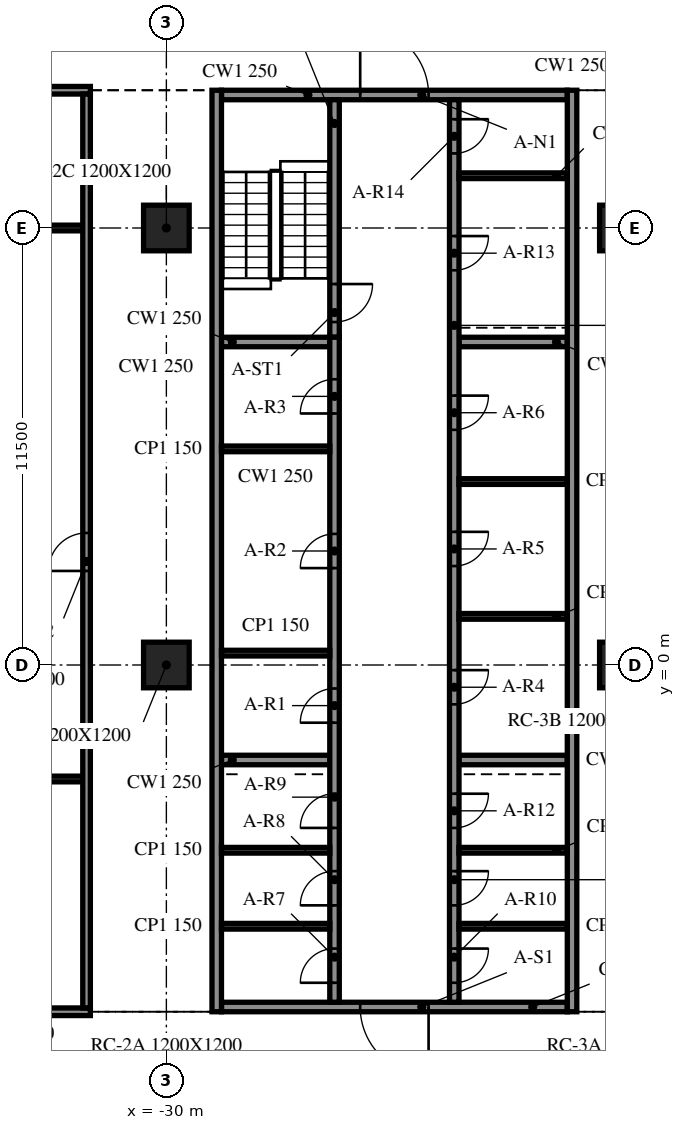
"""IFC4 building model, lengths in metres.
Left out: names, types, materials, properties, quantities, classifications, styles, units other than length and angle.
Written with IfcOpenShell. Run it as: python <this file> out.ifc"""

import sys

from ifc_helpers import new_model, si_unit, direction, frame, frame_2d, origin, origin_2d, place, context, subcontext, project, spatial, rectangle, extrude, element, fill, save


model = new_model("IFC4")
c1 = context("Model", 3, precision=1e-05, world=origin(), true_north=direction((0.0, 1.0)))
c2 = subcontext(c1, "Body", "Model", "MODEL_VIEW")
j1 = project(units=[si_unit("LENGTHUNIT", "METRE"), si_unit("PLANEANGLEUNIT", "RADIAN")], contexts=[c1])
p1 = place(None, origin())
s1 = spatial("IfcSite", under=j1, at=p1, CompositionType="ELEMENT")
p2 = place(p1, origin())
s2 = spatial("IfcBuilding", under=s1, at=p2, CompositionType="ELEMENT")
p3 = place(p2, frame((0.0, 0.0, 185.8)))
s3 = spatial("IfcBuildingStorey", under=s2, at=p3, CompositionType="ELEMENT", Elevation=185.8)
for number, where, z_axis, x_axis in (
    (1, (-30.0, 0.0, -0.34), (0.0, 0.0, 1.0), (1.0, 0.0, 0.0)),
    (2, (-30.0, 11.5, -0.34), (0.0, 0.0, 1.0), (1.0, 0.0, 0.0)),
    (3, (-18.0, 0.0, -0.34), (0.0, 0.0, 1.0), (1.0, 0.0, 0.0)),
    (4, (-18.0, 11.5, -0.34), (0.0, 0.0, 1.0), (1.0, 0.0, 0.0)),
):
    element("IfcColumn", number, at=place(p3, frame(where, z_axis=z_axis, x_axis=x_axis)), inside=s3, PredefinedType="COLUMN", context=c2, shape_type="SweptSolid", body=[
        extrude(rectangle(XDim=1.2, YDim=1.2, at=origin_2d()), origin(), (0.0, 0.0, 1.0), 3.74),
    ])
for number, where, z_axis, x_axis in (
    (5, (-28.675, 15.125, 0.0), (0.0, 0.0, 1.0), (0.0, -1.0, 0.0)),
    (6, (-19.325, -9.125, 0.0), (0.0, 0.0, 1.0), (0.0, 1.0, 0.0)),
):
    element("IfcWall", number, at=place(p3, frame(where, z_axis=z_axis, x_axis=x_axis)), inside=s3, PredefinedType="SOLIDWALL", context=c2, shape_type="SweptSolid", body=[
        extrude(rectangle(XDim=24.25, YDim=0.25, at=frame_2d((12.125, 0.0))), origin(), (0.0, 0.0, 1.0), 3.4),
    ])
p4 = place(p3, frame((-19.45, -9.0, 0.0), z_axis=(0.0, 0.0, 1.0), x_axis=(-1.0, 0.0, 0.0)))
e7 = element("IfcWall", 7, at=p4, inside=s3, PredefinedType="SOLIDWALL", context=c2, shape_type="SweptSolid", body=[
    extrude(rectangle(XDim=9.1, YDim=0.25, at=frame_2d((4.55, 0.0))), origin(), (0.0, 0.0, 1.0), 3.4),
])
p5 = place(p4, frame((3.65, 0.0, 0.0)))
e8 = element("IfcOpeningElement", 8, at=p5, cuts=e7, PredefinedType="OPENING", context=c2, shape_type="SweptSolid", body=[
    extrude(rectangle(XDim=1.8, YDim=2.1, at=frame_2d((0.9, 1.05))), frame((0.0, 0.135, 0.0), z_axis=(0.0, -1.0, 0.0), x_axis=(1.0, 0.0, 0.0)), (0.0, 0.0, 1.0), 0.27),
])
p6 = place(p3, frame((-28.55, 15.0, 0.0), z_axis=(0.0, 0.0, 1.0), x_axis=(1.0, 0.0, 0.0)))
e9 = element("IfcWall", 9, at=p6, inside=s3, PredefinedType="SOLIDWALL", context=c2, shape_type="SweptSolid", body=[
    extrude(rectangle(XDim=9.1, YDim=0.25, at=frame_2d((4.55, 0.0))), origin(), (0.0, 0.0, 1.0), 3.4),
])
p7 = place(p6, frame((3.65, 0.0, 0.0)))
e10 = element("IfcOpeningElement", 10, at=p7, cuts=e9, PredefinedType="OPENING", context=c2, shape_type="SweptSolid", body=[
    extrude(rectangle(XDim=1.8, YDim=2.1, at=frame_2d((0.9, 1.05))), frame((0.0, 0.135, 0.0), z_axis=(0.0, -1.0, 0.0), x_axis=(1.0, 0.0, 0.0)), (0.0, 0.0, 1.0), 0.27),
])
p8 = place(p3, frame((-25.575, -8.875, 0.0), z_axis=(0.0, 0.0, 1.0), x_axis=(0.0, 1.0, 0.0)))
e11 = element("IfcWall", 11, at=p8, inside=s3, PredefinedType="SOLIDWALL", context=c2, shape_type="SweptSolid", body=[
    extrude(rectangle(XDim=17.5, YDim=0.25, at=frame_2d((8.75, 0.0))), origin(), (0.0, 0.0, 1.0), 3.4),
])
p9 = place(p8, frame((7.356, 0.0, 0.0)))
e12 = element("IfcOpeningElement", 12, at=p9, cuts=e11, PredefinedType="OPENING", context=c2, shape_type="SweptSolid", body=[
    extrude(rectangle(XDim=0.9, YDim=2.1, at=frame_2d((0.45, 1.05))), frame((0.0, 0.135, 0.0), z_axis=(0.0, -1.0, 0.0), x_axis=(1.0, 0.0, 0.0)), (0.0, 0.0, 1.0), 0.27),
])
p10 = place(p8, frame((11.425, 0.0, 0.0)))
e13 = element("IfcOpeningElement", 13, at=p10, cuts=e11, PredefinedType="OPENING", context=c2, shape_type="SweptSolid", body=[
    extrude(rectangle(XDim=0.9, YDim=2.1, at=frame_2d((0.45, 1.05))), frame((0.0, 0.135, 0.0), z_axis=(0.0, -1.0, 0.0), x_axis=(1.0, 0.0, 0.0)), (0.0, 0.0, 1.0), 0.27),
])
p11 = place(p8, frame((15.494, 0.0, 0.0)))
e14 = element("IfcOpeningElement", 14, at=p11, cuts=e11, PredefinedType="OPENING", context=c2, shape_type="SweptSolid", body=[
    extrude(rectangle(XDim=0.9, YDim=2.1, at=frame_2d((0.45, 1.05))), frame((0.0, 0.135, 0.0), z_axis=(0.0, -1.0, 0.0), x_axis=(1.0, 0.0, 0.0)), (0.0, 0.0, 1.0), 0.27),
])
p12 = place(p8, frame((0.512, 0.0, 0.0)))
e15 = element("IfcOpeningElement", 15, at=p12, cuts=e11, PredefinedType="OPENING", context=c2, shape_type="SweptSolid", body=[
    extrude(rectangle(XDim=0.9, YDim=2.1, at=frame_2d((0.45, 1.05))), frame((0.0, 0.135, 0.0), z_axis=(0.0, -1.0, 0.0), x_axis=(1.0, 0.0, 0.0)), (0.0, 0.0, 1.0), 0.27),
])
p13 = place(p8, frame((2.55, 0.0, 0.0)))
e16 = element("IfcOpeningElement", 16, at=p13, cuts=e11, PredefinedType="OPENING", context=c2, shape_type="SweptSolid", body=[
    extrude(rectangle(XDim=0.9, YDim=2.1, at=frame_2d((0.45, 1.05))), frame((0.0, 0.135, 0.0), z_axis=(0.0, -1.0, 0.0), x_axis=(1.0, 0.0, 0.0)), (0.0, 0.0, 1.0), 0.27),
])
p14 = place(p8, frame((4.587, 0.0, 0.0)))
e17 = element("IfcOpeningElement", 17, at=p14, cuts=e11, PredefinedType="OPENING", context=c2, shape_type="SweptSolid", body=[
    extrude(rectangle(XDim=0.9, YDim=2.1, at=frame_2d((0.45, 1.05))), frame((0.0, 0.135, 0.0), z_axis=(0.0, -1.0, 0.0), x_axis=(1.0, 0.0, 0.0)), (0.0, 0.0, 1.0), 0.27),
])
p15 = place(p3, frame((-25.575, 14.875, 0.0), z_axis=(0.0, 0.0, 1.0), x_axis=(0.0, -1.0, 0.0)))
e18 = element("IfcWall", 18, at=p15, inside=s3, PredefinedType="SOLIDWALL", context=c2, shape_type="SweptSolid", body=[
    extrude(rectangle(XDim=6.25, YDim=0.25, at=frame_2d((3.125, 0.0))), origin(), (0.0, 0.0, 1.0), 3.4),
])
p16 = place(p15, frame((4.85, 0.0, 0.0)))
e19 = element("IfcOpeningElement", 19, at=p16, cuts=e18, PredefinedType="OPENING", context=c2, shape_type="SweptSolid", body=[
    extrude(rectangle(XDim=1.0, YDim=2.1, at=frame_2d((0.5, 1.05))), frame((0.0, 0.135, 0.0), z_axis=(0.0, -1.0, 0.0), x_axis=(1.0, 0.0, 0.0)), (0.0, 0.0, 1.0), 0.27),
])
p17 = place(p3, frame((-22.425, 14.875, 0.0), z_axis=(0.0, 0.0, 1.0), x_axis=(0.0, -1.0, 0.0)))
e20 = element("IfcWall", 20, at=p17, inside=s3, PredefinedType="SOLIDWALL", context=c2, shape_type="SweptSolid", body=[
    extrude(rectangle(XDim=23.75, YDim=0.25, at=frame_2d((11.875, 0.0))), origin(), (0.0, 0.0, 1.0), 3.4),
])
p18 = place(p17, frame((15.01, 0.0, 0.0)))
e21 = element("IfcOpeningElement", 21, at=p18, cuts=e20, PredefinedType="OPENING", context=c2, shape_type="SweptSolid", body=[
    extrude(rectangle(XDim=0.9, YDim=2.1, at=frame_2d((0.45, 1.05))), frame((0.0, 0.135, 0.0), z_axis=(0.0, -1.0, 0.0), x_axis=(1.0, 0.0, 0.0)), (0.0, 0.0, 1.0), 0.27),
])
p19 = place(p17, frame((11.371, 0.0, 0.0)))
e22 = element("IfcOpeningElement", 22, at=p19, cuts=e20, PredefinedType="OPENING", context=c2, shape_type="SweptSolid", body=[
    extrude(rectangle(XDim=0.9, YDim=2.1, at=frame_2d((0.45, 1.05))), frame((0.0, 0.135, 0.0), z_axis=(0.0, -1.0, 0.0), x_axis=(1.0, 0.0, 0.0)), (0.0, 0.0, 1.0), 0.27),
])
p20 = place(p17, frame((7.786, 0.0, 0.0)))
e23 = element("IfcOpeningElement", 23, at=p20, cuts=e20, PredefinedType="OPENING", context=c2, shape_type="SweptSolid", body=[
    extrude(rectangle(XDim=0.9, YDim=2.1, at=frame_2d((0.45, 1.05))), frame((0.0, 0.135, 0.0), z_axis=(0.0, -1.0, 0.0), x_axis=(1.0, 0.0, 0.0)), (0.0, 0.0, 1.0), 0.27),
])
p21 = place(p17, frame((22.337, 0.0, 0.0)))
e24 = element("IfcOpeningElement", 24, at=p21, cuts=e20, PredefinedType="OPENING", context=c2, shape_type="SweptSolid", body=[
    extrude(rectangle(XDim=0.9, YDim=2.1, at=frame_2d((0.45, 1.05))), frame((0.0, 0.135, 0.0), z_axis=(0.0, -1.0, 0.0), x_axis=(1.0, 0.0, 0.0)), (0.0, 0.0, 1.0), 0.27),
])
p22 = place(p17, frame((20.3, 0.0, 0.0)))
e25 = element("IfcOpeningElement", 25, at=p22, cuts=e20, PredefinedType="OPENING", context=c2, shape_type="SweptSolid", body=[
    extrude(rectangle(XDim=0.9, YDim=2.1, at=frame_2d((0.45, 1.05))), frame((0.0, 0.135, 0.0), z_axis=(0.0, -1.0, 0.0), x_axis=(1.0, 0.0, 0.0)), (0.0, 0.0, 1.0), 0.27),
])
p23 = place(p17, frame((18.262, 0.0, 0.0)))
e26 = element("IfcOpeningElement", 26, at=p23, cuts=e20, PredefinedType="OPENING", context=c2, shape_type="SweptSolid", body=[
    extrude(rectangle(XDim=0.9, YDim=2.1, at=frame_2d((0.45, 1.05))), frame((0.0, 0.135, 0.0), z_axis=(0.0, -1.0, 0.0), x_axis=(1.0, 0.0, 0.0)), (0.0, 0.0, 1.0), 0.27),
])
p24 = place(p17, frame((3.587, 0.0, 0.0)))
e27 = element("IfcOpeningElement", 27, at=p24, cuts=e20, PredefinedType="OPENING", context=c2, shape_type="SweptSolid", body=[
    extrude(rectangle(XDim=0.9, YDim=2.1, at=frame_2d((0.45, 1.05))), frame((0.0, 0.135, 0.0), z_axis=(0.0, -1.0, 0.0), x_axis=(1.0, 0.0, 0.0)), (0.0, 0.0, 1.0), 0.27),
])
p25 = place(p17, frame((0.512, 0.0, 0.0)))
e28 = element("IfcOpeningElement", 28, at=p25, cuts=e20, PredefinedType="OPENING", context=c2, shape_type="SweptSolid", body=[
    extrude(rectangle(XDim=0.9, YDim=2.1, at=frame_2d((0.45, 1.05))), frame((0.0, 0.135, 0.0), z_axis=(0.0, -1.0, 0.0), x_axis=(1.0, 0.0, 0.0)), (0.0, 0.0, 1.0), 0.27),
])
for number, where, z_axis, x_axis in (
    (29, (-28.55, -2.5, 0.0), (0.0, 0.0, 1.0), (1.0, 0.0, 0.0)),
    (30, (-28.55, 8.5, 0.0), (0.0, 0.0, 1.0), (1.0, 0.0, 0.0)),
    (31, (-22.3, -2.5, 0.0), (0.0, 0.0, 1.0), (1.0, 0.0, 0.0)),
    (32, (-22.3, 8.5, 0.0), (0.0, 0.0, 1.0), (1.0, 0.0, 0.0)),
):
    element("IfcWall", number, at=place(p3, frame(where, z_axis=z_axis, x_axis=x_axis)), inside=s3, PredefinedType="SOLIDWALL", context=c2, shape_type="SweptSolid", body=[
        extrude(rectangle(XDim=2.85, YDim=0.25, at=frame_2d((1.425, 0.0))), origin(), (0.0, 0.0, 1.0), 3.4),
    ])
for number, where, z_axis, x_axis in (
    (33, (-28.55, 0.312, 0.0), (0.0, 0.0, 1.0), (1.0, 0.0, 0.0)),
    (34, (-28.55, 5.688, 0.0), (0.0, 0.0, 1.0), (1.0, 0.0, 0.0)),
    (35, (-22.3, 1.28, 0.0), (0.0, 0.0, 1.0), (1.0, 0.0, 0.0)),
    (36, (-22.3, 4.827, 0.0), (0.0, 0.0, 1.0), (1.0, 0.0, 0.0)),
    (37, (-28.55, -6.875, 0.0), (0.0, 0.0, 1.0), (1.0, 0.0, 0.0)),
    (38, (-28.55, -4.875, 0.0), (0.0, 0.0, 1.0), (1.0, 0.0, 0.0)),
    (39, (-22.3, -6.875, 0.0), (0.0, 0.0, 1.0), (1.0, 0.0, 0.0)),
    (40, (-22.3, -4.875, 0.0), (0.0, 0.0, 1.0), (1.0, 0.0, 0.0)),
    (41, (-22.3, 12.875, 0.0), (0.0, 0.0, 1.0), (1.0, 0.0, 0.0)),
):
    element("IfcWall", number, at=place(p3, frame(where, z_axis=z_axis, x_axis=x_axis)), inside=s3, PredefinedType="PARTITIONING", context=c2, shape_type="SweptSolid", body=[
        extrude(rectangle(XDim=2.85, YDim=0.15, at=frame_2d((1.425, 0.0))), origin(), (0.0, 0.0, 1.0), 3.4),
    ])
p26 = place(p3, frame((-47.975, -9.125, 0.0), z_axis=(0.0, 0.0, 1.0), x_axis=(1.0, 0.0, 0.0)))
e42 = element("IfcWall", 42, at=p26, inside=s3, PredefinedType="PARTITIONING", context=c2, shape_type="SweptSolid", body=[
    extrude(rectangle(XDim=15.975, YDim=0.2, at=frame_2d((7.988, 0.0))), origin(), (0.0, 0.0, 1.0), 3.4),
])
p27 = place(p26, frame((7.5, 0.0, 0.0)))
e43 = element("IfcOpeningElement", 43, at=p27, cuts=e42, PredefinedType="OPENING", context=c2, shape_type="SweptSolid", body=[
    extrude(rectangle(XDim=1.0, YDim=2.1, at=frame_2d((0.5, 1.05))), frame((0.0, 0.11, 0.0), z_axis=(0.0, -1.0, 0.0), x_axis=(1.0, 0.0, 0.0)), (0.0, 0.0, 1.0), 0.22),
])
p28 = place(p3, frame((-47.975, -3.0, 0.0), z_axis=(0.0, 0.0, 1.0), x_axis=(1.0, 0.0, 0.0)))
e44 = element("IfcWall", 44, at=p28, inside=s3, PredefinedType="PARTITIONING", context=c2, shape_type="SweptSolid", body=[
    extrude(rectangle(XDim=15.775, YDim=0.15, at=frame_2d((7.888, 0.0))), origin(), (0.0, 0.0, 1.0), 3.4),
])
p29 = place(p3, frame((-41.4, 11.5, 0.0), z_axis=(0.0, 0.0, 1.0), x_axis=(1.0, 0.0, 0.0)))
e45 = element("IfcWall", 45, at=p29, inside=s3, PredefinedType="PARTITIONING", context=c2, shape_type="SweptSolid", body=[
    extrude(rectangle(XDim=9.2, YDim=0.15, at=frame_2d((4.6, 0.0))), origin(), (0.0, 0.0, 1.0), 3.4),
])
p30 = place(p3, frame((-47.975, 15.125, 0.0), z_axis=(0.0, 0.0, 1.0), x_axis=(1.0, 0.0, 0.0)))
e46 = element("IfcWall", 46, at=p30, inside=s3, PredefinedType="PARTITIONING", context=c2, shape_type="SweptSolid", body=[
    extrude(rectangle(XDim=15.975, YDim=0.2, at=frame_2d((7.988, 0.0))), origin(), (0.0, 0.0, 1.0), 3.4),
])
p31 = place(p30, frame((7.5, 0.0, 0.0)))
e47 = element("IfcOpeningElement", 47, at=p31, cuts=e46, PredefinedType="OPENING", context=c2, shape_type="SweptSolid", body=[
    extrude(rectangle(XDim=0.9, YDim=2.1, at=frame_2d((0.45, 1.05))), frame((0.0, 0.11, 0.0), z_axis=(0.0, -1.0, 0.0), x_axis=(1.0, 0.0, 0.0)), (0.0, 0.0, 1.0), 0.22),
])
p32 = place(p3, frame((-32.1, -9.025, 0.0), z_axis=(0.0, 0.0, 1.0), x_axis=(0.0, 1.0, 0.0)))
e48 = element("IfcWall", 48, at=p32, inside=s3, PredefinedType="PARTITIONING", context=c2, shape_type="SweptSolid", body=[
    extrude(rectangle(XDim=24.05, YDim=0.2, at=frame_2d((12.025, 0.0))), origin(), (0.0, 0.0, 1.0), 3.4),
])
p33 = place(p32, frame((11.5, 0.0, 0.0)))
e49 = element("IfcOpeningElement", 49, at=p33, cuts=e48, PredefinedType="OPENING", context=c2, shape_type="SweptSolid", body=[
    extrude(rectangle(XDim=1.0, YDim=2.1, at=frame_2d((0.5, 1.05))), frame((0.0, 0.11, 0.0), z_axis=(0.0, -1.0, 0.0), x_axis=(1.0, 0.0, 0.0)), (0.0, 0.0, 1.0), 0.22),
])
p34 = place(p5, origin())
e50 = element("IfcDoor", 50, at=p34, inside=s3, OperationType="DOUBLE_DOOR_SINGLE_SWING", PredefinedType="DOOR", context=c2, shape_type="SweptSolid", body=[
    extrude(rectangle(XDim=1.8, YDim=2.1, at=frame_2d((0.9, 1.05))), frame((0.0, 0.025, 0.0), z_axis=(0.0, -1.0, 0.0), x_axis=(1.0, 0.0, 0.0)), (0.0, 0.0, 1.0), 0.05),
])
fill(e8, e50)
p35 = place(p7, origin())
e51 = element("IfcDoor", 51, at=p35, inside=s3, OperationType="DOUBLE_DOOR_SINGLE_SWING", PredefinedType="DOOR", context=c2, shape_type="SweptSolid", body=[
    extrude(rectangle(XDim=1.8, YDim=2.1, at=frame_2d((0.9, 1.05))), frame((0.0, 0.025, 0.0), z_axis=(0.0, -1.0, 0.0), x_axis=(1.0, 0.0, 0.0)), (0.0, 0.0, 1.0), 0.05),
])
fill(e10, e51)
p36 = place(p9, origin())
e52 = element("IfcDoor", 52, at=p36, inside=s3, OperationType="SINGLE_SWING_LEFT", PredefinedType="DOOR", context=c2, shape_type="SweptSolid", body=[
    extrude(rectangle(XDim=0.9, YDim=2.1, at=frame_2d((0.45, 1.05))), frame((0.0, 0.025, 0.0), z_axis=(0.0, -1.0, 0.0), x_axis=(1.0, 0.0, 0.0)), (0.0, 0.0, 1.0), 0.05),
])
fill(e12, e52)
p37 = place(p10, origin())
e53 = element("IfcDoor", 53, at=p37, inside=s3, OperationType="SINGLE_SWING_RIGHT", PredefinedType="DOOR", context=c2, shape_type="SweptSolid", body=[
    extrude(rectangle(XDim=0.9, YDim=2.1, at=frame_2d((0.45, 1.05))), frame((0.0, 0.025, 0.0), z_axis=(0.0, -1.0, 0.0), x_axis=(1.0, 0.0, 0.0)), (0.0, 0.0, 1.0), 0.05),
])
fill(e13, e53)
p38 = place(p11, origin())
e54 = element("IfcDoor", 54, at=p38, inside=s3, OperationType="SINGLE_SWING_LEFT", PredefinedType="DOOR", context=c2, shape_type="SweptSolid", body=[
    extrude(rectangle(XDim=0.9, YDim=2.1, at=frame_2d((0.45, 1.05))), frame((0.0, 0.025, 0.0), z_axis=(0.0, -1.0, 0.0), x_axis=(1.0, 0.0, 0.0)), (0.0, 0.0, 1.0), 0.05),
])
fill(e14, e54)
p39 = place(p18, origin())
e55 = element("IfcDoor", 55, at=p39, inside=s3, OperationType="SINGLE_SWING_RIGHT", PredefinedType="DOOR", context=c2, shape_type="SweptSolid", body=[
    extrude(rectangle(XDim=0.9, YDim=2.1, at=frame_2d((0.45, 1.05))), frame((0.0, 0.025, 0.0), z_axis=(0.0, -1.0, 0.0), x_axis=(1.0, 0.0, 0.0)), (0.0, 0.0, 1.0), 0.05),
])
fill(e21, e55)
p40 = place(p19, origin())
e56 = element("IfcDoor", 56, at=p40, inside=s3, OperationType="SINGLE_SWING_LEFT", PredefinedType="DOOR", context=c2, shape_type="SweptSolid", body=[
    extrude(rectangle(XDim=0.9, YDim=2.1, at=frame_2d((0.45, 1.05))), frame((0.0, 0.025, 0.0), z_axis=(0.0, -1.0, 0.0), x_axis=(1.0, 0.0, 0.0)), (0.0, 0.0, 1.0), 0.05),
])
fill(e22, e56)
p41 = place(p20, origin())
e57 = element("IfcDoor", 57, at=p41, inside=s3, OperationType="SINGLE_SWING_RIGHT", PredefinedType="DOOR", context=c2, shape_type="SweptSolid", body=[
    extrude(rectangle(XDim=0.9, YDim=2.1, at=frame_2d((0.45, 1.05))), frame((0.0, 0.025, 0.0), z_axis=(0.0, -1.0, 0.0), x_axis=(1.0, 0.0, 0.0)), (0.0, 0.0, 1.0), 0.05),
])
fill(e23, e57)
p42 = place(p12, origin())
e58 = element("IfcDoor", 58, at=p42, inside=s3, OperationType="SINGLE_SWING_LEFT", PredefinedType="DOOR", context=c2, shape_type="SweptSolid", body=[
    extrude(rectangle(XDim=0.9, YDim=2.1, at=frame_2d((0.45, 1.05))), frame((0.0, 0.025, 0.0), z_axis=(0.0, -1.0, 0.0), x_axis=(1.0, 0.0, 0.0)), (0.0, 0.0, 1.0), 0.05),
])
fill(e15, e58)
p43 = place(p13, origin())
e59 = element("IfcDoor", 59, at=p43, inside=s3, OperationType="SINGLE_SWING_RIGHT", PredefinedType="DOOR", context=c2, shape_type="SweptSolid", body=[
    extrude(rectangle(XDim=0.9, YDim=2.1, at=frame_2d((0.45, 1.05))), frame((0.0, 0.025, 0.0), z_axis=(0.0, -1.0, 0.0), x_axis=(1.0, 0.0, 0.0)), (0.0, 0.0, 1.0), 0.05),
])
fill(e16, e59)
p44 = place(p14, origin())
e60 = element("IfcDoor", 60, at=p44, inside=s3, OperationType="SINGLE_SWING_LEFT", PredefinedType="DOOR", context=c2, shape_type="SweptSolid", body=[
    extrude(rectangle(XDim=0.9, YDim=2.1, at=frame_2d((0.45, 1.05))), frame((0.0, 0.025, 0.0), z_axis=(0.0, -1.0, 0.0), x_axis=(1.0, 0.0, 0.0)), (0.0, 0.0, 1.0), 0.05),
])
fill(e17, e60)
p45 = place(p21, origin())
e61 = element("IfcDoor", 61, at=p45, inside=s3, OperationType="SINGLE_SWING_RIGHT", PredefinedType="DOOR", context=c2, shape_type="SweptSolid", body=[
    extrude(rectangle(XDim=0.9, YDim=2.1, at=frame_2d((0.45, 1.05))), frame((0.0, 0.025, 0.0), z_axis=(0.0, -1.0, 0.0), x_axis=(1.0, 0.0, 0.0)), (0.0, 0.0, 1.0), 0.05),
])
fill(e24, e61)
p46 = place(p22, origin())
e62 = element("IfcDoor", 62, at=p46, inside=s3, OperationType="SINGLE_SWING_LEFT", PredefinedType="DOOR", context=c2, shape_type="SweptSolid", body=[
    extrude(rectangle(XDim=0.9, YDim=2.1, at=frame_2d((0.45, 1.05))), frame((0.0, 0.025, 0.0), z_axis=(0.0, -1.0, 0.0), x_axis=(1.0, 0.0, 0.0)), (0.0, 0.0, 1.0), 0.05),
])
fill(e25, e62)
p47 = place(p23, origin())
e63 = element("IfcDoor", 63, at=p47, inside=s3, OperationType="SINGLE_SWING_RIGHT", PredefinedType="DOOR", context=c2, shape_type="SweptSolid", body=[
    extrude(rectangle(XDim=0.9, YDim=2.1, at=frame_2d((0.45, 1.05))), frame((0.0, 0.025, 0.0), z_axis=(0.0, -1.0, 0.0), x_axis=(1.0, 0.0, 0.0)), (0.0, 0.0, 1.0), 0.05),
])
fill(e26, e63)
p48 = place(p24, origin())
e64 = element("IfcDoor", 64, at=p48, inside=s3, OperationType="SINGLE_SWING_LEFT", PredefinedType="DOOR", context=c2, shape_type="SweptSolid", body=[
    extrude(rectangle(XDim=0.9, YDim=2.1, at=frame_2d((0.45, 1.05))), frame((0.0, 0.025, 0.0), z_axis=(0.0, -1.0, 0.0), x_axis=(1.0, 0.0, 0.0)), (0.0, 0.0, 1.0), 0.05),
])
fill(e27, e64)
p49 = place(p25, origin())
e65 = element("IfcDoor", 65, at=p49, inside=s3, OperationType="SINGLE_SWING_RIGHT", PredefinedType="DOOR", context=c2, shape_type="SweptSolid", body=[
    extrude(rectangle(XDim=0.9, YDim=2.1, at=frame_2d((0.45, 1.05))), frame((0.0, 0.025, 0.0), z_axis=(0.0, -1.0, 0.0), x_axis=(1.0, 0.0, 0.0)), (0.0, 0.0, 1.0), 0.05),
])
fill(e28, e65)
p50 = place(p16, origin())
e66 = element("IfcDoor", 66, at=p50, inside=s3, OperationType="SINGLE_SWING_LEFT", PredefinedType="DOOR", context=c2, shape_type="SweptSolid", body=[
    extrude(rectangle(XDim=1.0, YDim=2.1, at=frame_2d((0.5, 1.05))), frame((0.0, 0.025, 0.0), z_axis=(0.0, -1.0, 0.0), x_axis=(1.0, 0.0, 0.0)), (0.0, 0.0, 1.0), 0.05),
])
fill(e19, e66)
p51 = place(p33, origin())
e67 = element("IfcDoor", 67, at=p51, inside=s3, OperationType="SINGLE_SWING_LEFT", PredefinedType="DOOR", context=c2, shape_type="SweptSolid", body=[
    extrude(rectangle(XDim=1.0, YDim=2.1, at=frame_2d((0.5, 1.05))), frame((0.0, 0.025, 0.0), z_axis=(0.0, -1.0, 0.0), x_axis=(1.0, 0.0, 0.0)), (0.0, 0.0, 1.0), 0.05),
])
fill(e49, e67)
save(model, sys.argv[1])
